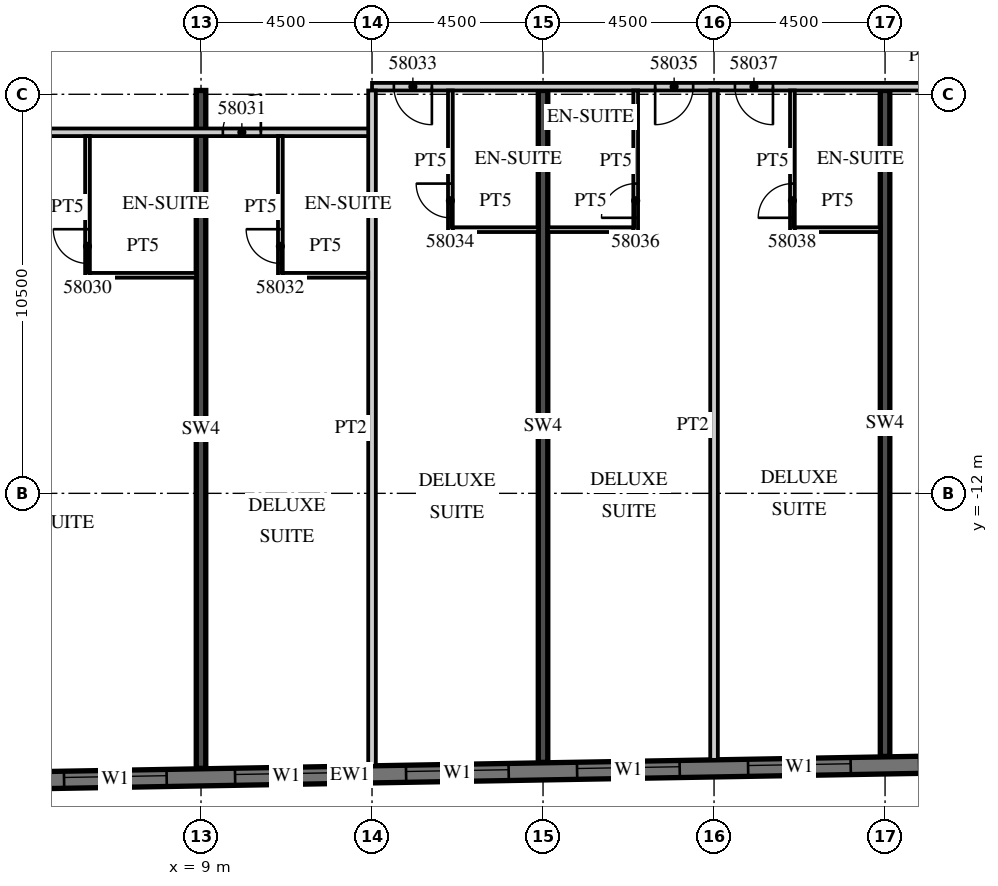
"""IFC4 building model, lengths in metres.
Left out: names, types, materials, properties, quantities, classifications, styles, units other than length and angle.
Written with IfcOpenShell. Run it as: python <this file> out.ifc"""

import sys

from ifc_helpers import new_model, si_unit, direction, frame, frame_2d, origin, place, context, subcontext, project, spatial, rectangle, extrude, element, fill, save


model = new_model("IFC4")
c1 = context("Model", 3, precision=1e-05, world=origin(), true_north=direction((0.0, 1.0)))
c2 = subcontext(c1, "Body", "Model", "MODEL_VIEW")
j1 = project(units=[si_unit("LENGTHUNIT", "METRE"), si_unit("PLANEANGLEUNIT", "RADIAN")], contexts=[c1])
p1 = place(None, origin())
s1 = spatial("IfcSite", under=j1, at=p1, CompositionType="ELEMENT")
p2 = place(p1, origin())
s2 = spatial("IfcBuilding", under=s1, at=p2, CompositionType="ELEMENT")
p3 = place(p2, frame((0.0, 0.0, 237.5)))
s3 = spatial("IfcBuildingStorey", under=s2, at=p3, CompositionType="ELEMENT", Elevation=237.5)
p4 = place(p3, frame((9.0, -19.236, 0.0), z_axis=(0.0, 0.0, 1.0), x_axis=(0.0, 1.0, 0.0)))
e1 = element("IfcWall", 1, at=p4, inside=s3, PredefinedType="SHEAR", context=c2, shape_type="SweptSolid", body=[
    extrude(rectangle(XDim=17.836, YDim=0.25, at=frame_2d((8.918, 0.0))), origin(), (0.0, 0.0, 1.0), 3.3),
])
p5 = place(p3, frame((18.0, -19.079, 0.0), z_axis=(0.0, 0.0, 1.0), x_axis=(0.0, 1.0, 0.0)))
e2 = element("IfcWall", 2, at=p5, inside=s3, PredefinedType="SHEAR", context=c2, shape_type="SweptSolid", body=[
    extrude(rectangle(XDim=17.679, YDim=0.25, at=frame_2d((8.84, 0.0))), origin(), (0.0, 0.0, 1.0), 3.3),
])
p6 = place(p3, frame((27.0, -18.922, 0.0), z_axis=(0.0, 0.0, 1.0), x_axis=(0.0, 1.0, 0.0)))
e3 = element("IfcWall", 3, at=p6, inside=s3, PredefinedType="SHEAR", context=c2, shape_type="SweptSolid", body=[
    extrude(rectangle(XDim=17.522, YDim=0.25, at=frame_2d((8.761, 0.0))), origin(), (0.0, 0.0, 1.0), 3.3),
])
p7 = place(p3, frame((-13.504, -19.866, 0.0), z_axis=(0.0, 0.0, 1.0), x_axis=(0.999847672978, 0.017453676992, 0.0)))
e4 = element("IfcWall", 4, at=p7, inside=s3, PredefinedType="SOLIDWALL", context=c2, shape_type="SweptSolid", body=[
    extrude(rectangle(XDim=52.86, YDim=0.45, at=frame_2d((26.43, 0.0))), origin(), (0.0, 0.0, 1.0), 3.02),
])
p8 = place(p7, frame((0.9, 0.0, 0.45)))
e5 = element("IfcOpeningElement", 5, at=p8, cuts=e4, PredefinedType="OPENING", context=c2, shape_type="SweptSolid", body=[
    extrude(rectangle(XDim=2.7, YDim=2.25, at=frame_2d((1.35, 1.125))), frame((0.0, 0.235, 0.0), z_axis=(0.0, -1.0, 0.0), x_axis=(1.0, 0.0, 0.0)), (0.0, 0.0, 1.0), 0.47),
])
p9 = place(p7, frame((5.401, 0.0, 0.45)))
e6 = element("IfcOpeningElement", 6, at=p9, cuts=e4, PredefinedType="OPENING", context=c2, shape_type="SweptSolid", body=[
    extrude(rectangle(XDim=2.7, YDim=2.25, at=frame_2d((1.35, 1.125))), frame((0.0, 0.235, 0.0), z_axis=(0.0, -1.0, 0.0), x_axis=(1.0, 0.0, 0.0)), (0.0, 0.0, 1.0), 0.47),
])
p10 = place(p7, frame((9.902, 0.0, 0.45)))
e7 = element("IfcOpeningElement", 7, at=p10, cuts=e4, PredefinedType="OPENING", context=c2, shape_type="SweptSolid", body=[
    extrude(rectangle(XDim=2.7, YDim=2.25, at=frame_2d((1.35, 1.125))), frame((0.0, 0.235, 0.0), z_axis=(0.0, -1.0, 0.0), x_axis=(1.0, 0.0, 0.0)), (0.0, 0.0, 1.0), 0.47),
])
p11 = place(p7, frame((14.402, 0.0, 0.45)))
e8 = element("IfcOpeningElement", 8, at=p11, cuts=e4, PredefinedType="OPENING", context=c2, shape_type="SweptSolid", body=[
    extrude(rectangle(XDim=2.7, YDim=2.25, at=frame_2d((1.35, 1.125))), frame((0.0, 0.235, 0.0), z_axis=(0.0, -1.0, 0.0), x_axis=(1.0, 0.0, 0.0)), (0.0, 0.0, 1.0), 0.47),
])
p12 = place(p7, frame((18.903, 0.0, 0.45)))
e9 = element("IfcOpeningElement", 9, at=p12, cuts=e4, PredefinedType="OPENING", context=c2, shape_type="SweptSolid", body=[
    extrude(rectangle(XDim=2.7, YDim=2.25, at=frame_2d((1.35, 1.125))), frame((0.0, 0.235, 0.0), z_axis=(0.0, -1.0, 0.0), x_axis=(1.0, 0.0, 0.0)), (0.0, 0.0, 1.0), 0.47),
])
p13 = place(p7, frame((23.404, 0.0, 0.45)))
e10 = element("IfcOpeningElement", 10, at=p13, cuts=e4, PredefinedType="OPENING", context=c2, shape_type="SweptSolid", body=[
    extrude(rectangle(XDim=2.7, YDim=2.25, at=frame_2d((1.35, 1.125))), frame((0.0, 0.235, 0.0), z_axis=(0.0, -1.0, 0.0), x_axis=(1.0, 0.0, 0.0)), (0.0, 0.0, 1.0), 0.47),
])
p14 = place(p7, frame((27.904, 0.0, 0.45)))
e11 = element("IfcOpeningElement", 11, at=p14, cuts=e4, PredefinedType="OPENING", context=c2, shape_type="SweptSolid", body=[
    extrude(rectangle(XDim=2.7, YDim=2.25, at=frame_2d((1.35, 1.125))), frame((0.0, 0.235, 0.0), z_axis=(0.0, -1.0, 0.0), x_axis=(1.0, 0.0, 0.0)), (0.0, 0.0, 1.0), 0.47),
])
p15 = place(p7, frame((32.405, 0.0, 0.45)))
e12 = element("IfcOpeningElement", 12, at=p15, cuts=e4, PredefinedType="OPENING", context=c2, shape_type="SweptSolid", body=[
    extrude(rectangle(XDim=2.7, YDim=2.25, at=frame_2d((1.35, 1.125))), frame((0.0, 0.235, 0.0), z_axis=(0.0, -1.0, 0.0), x_axis=(1.0, 0.0, 0.0)), (0.0, 0.0, 1.0), 0.47),
])
p16 = place(p7, frame((36.906, 0.0, 0.45)))
e13 = element("IfcOpeningElement", 13, at=p16, cuts=e4, PredefinedType="OPENING", context=c2, shape_type="SweptSolid", body=[
    extrude(rectangle(XDim=2.7, YDim=2.25, at=frame_2d((1.35, 1.125))), frame((0.0, 0.235, 0.0), z_axis=(0.0, -1.0, 0.0), x_axis=(1.0, 0.0, 0.0)), (0.0, 0.0, 1.0), 0.47),
])
p17 = place(p7, frame((41.406, 0.0, 0.45)))
e14 = element("IfcOpeningElement", 14, at=p17, cuts=e4, PredefinedType="OPENING", context=c2, shape_type="SweptSolid", body=[
    extrude(rectangle(XDim=2.7, YDim=2.25, at=frame_2d((1.35, 1.125))), frame((0.0, 0.235, 0.0), z_axis=(0.0, -1.0, 0.0), x_axis=(1.0, 0.0, 0.0)), (0.0, 0.0, 1.0), 0.47),
])
p18 = place(p7, frame((45.907, 0.0, 0.45)))
e15 = element("IfcOpeningElement", 15, at=p18, cuts=e4, PredefinedType="OPENING", context=c2, shape_type="SweptSolid", body=[
    extrude(rectangle(XDim=2.7, YDim=2.25, at=frame_2d((1.35, 1.125))), frame((0.0, 0.235, 0.0), z_axis=(0.0, -1.0, 0.0), x_axis=(1.0, 0.0, 0.0)), (0.0, 0.0, 1.0), 0.47),
])
p19 = place(p3, frame((-13.5, -2.5, 0.0), z_axis=(0.0, 0.0, 1.0), x_axis=(1.0, 0.0, 0.0)))
e16 = element("IfcWall", 16, at=p19, inside=s3, PredefinedType="PARTITIONING", context=c2, shape_type="SweptSolid", body=[
    extrude(rectangle(XDim=27.0, YDim=0.2, at=frame_2d((13.5, 0.0))), origin(), (0.0, 0.0, 1.0), 3.02),
])
p20 = place(p19, frame((0.575, 0.0, 0.0)))
e17 = element("IfcOpeningElement", 17, at=p20, cuts=e16, PredefinedType="OPENING", context=c2, shape_type="SweptSolid", body=[
    extrude(rectangle(XDim=1.0, YDim=2.1, at=frame_2d((0.5, 1.05))), frame((0.0, 0.11, 0.0), z_axis=(0.0, -1.0, 0.0), x_axis=(1.0, 0.0, 0.0)), (0.0, 0.0, 1.0), 0.22),
])
p21 = place(p19, frame((9.863, 0.0, 0.0)))
e18 = element("IfcOpeningElement", 18, at=p21, cuts=e16, PredefinedType="OPENING", context=c2, shape_type="SweptSolid", body=[
    extrude(rectangle(XDim=1.2, YDim=2.1, at=frame_2d((0.6, 1.05))), frame((0.0, 0.11, 0.0), z_axis=(0.0, -1.0, 0.0), x_axis=(1.0, 0.0, 0.0)), (0.0, 0.0, 1.0), 0.22),
])
p22 = place(p19, frame((15.938, 0.0, 0.0)))
e19 = element("IfcOpeningElement", 19, at=p22, cuts=e16, PredefinedType="OPENING", context=c2, shape_type="SweptSolid", body=[
    extrude(rectangle(XDim=1.2, YDim=2.1, at=frame_2d((0.6, 1.05))), frame((0.0, 0.11, 0.0), z_axis=(0.0, -1.0, 0.0), x_axis=(1.0, 0.0, 0.0)), (0.0, 0.0, 1.0), 0.22),
])
p23 = place(p19, frame((23.075, 0.0, 0.0)))
e20 = element("IfcOpeningElement", 20, at=p23, cuts=e16, PredefinedType="OPENING", context=c2, shape_type="SweptSolid", body=[
    extrude(rectangle(XDim=1.0, YDim=2.1, at=frame_2d((0.5, 1.05))), frame((0.0, 0.11, 0.0), z_axis=(0.0, -1.0, 0.0), x_axis=(1.0, 0.0, 0.0)), (0.0, 0.0, 1.0), 0.22),
])
p24 = place(p3, frame((13.5, -1.3, 0.0), z_axis=(0.0, 0.0, 1.0), x_axis=(1.0, 0.0, 0.0)))
e21 = element("IfcWall", 21, at=p24, inside=s3, PredefinedType="PARTITIONING", context=c2, shape_type="SweptSolid", body=[
    extrude(rectangle(XDim=29.091, YDim=0.2, at=frame_2d((14.545, 0.0))), origin(), (0.0, 0.0, 1.0), 3.02),
])
p25 = place(p24, frame((0.575, 0.0, 0.0)))
e22 = element("IfcOpeningElement", 22, at=p25, cuts=e21, PredefinedType="OPENING", context=c2, shape_type="SweptSolid", body=[
    extrude(rectangle(XDim=1.0, YDim=2.1, at=frame_2d((0.5, 1.05))), frame((0.0, 0.11, 0.0), z_axis=(0.0, -1.0, 0.0), x_axis=(1.0, 0.0, 0.0)), (0.0, 0.0, 1.0), 0.22),
])
p26 = place(p24, frame((7.45, 0.0, 0.0)))
e23 = element("IfcOpeningElement", 23, at=p26, cuts=e21, PredefinedType="OPENING", context=c2, shape_type="SweptSolid", body=[
    extrude(rectangle(XDim=1.0, YDim=2.1, at=frame_2d((0.5, 1.05))), frame((0.0, 0.11, 0.0), z_axis=(0.0, -1.0, 0.0), x_axis=(1.0, 0.0, 0.0)), (0.0, 0.0, 1.0), 0.22),
])
p27 = place(p24, frame((9.55, 0.0, 0.0)))
e24 = element("IfcOpeningElement", 24, at=p27, cuts=e21, PredefinedType="OPENING", context=c2, shape_type="SweptSolid", body=[
    extrude(rectangle(XDim=1.0, YDim=2.1, at=frame_2d((0.5, 1.05))), frame((0.0, 0.11, 0.0), z_axis=(0.0, -1.0, 0.0), x_axis=(1.0, 0.0, 0.0)), (0.0, 0.0, 1.0), 0.22),
])
p28 = place(p24, frame((15.938, 0.0, 0.0)))
e25 = element("IfcOpeningElement", 25, at=p28, cuts=e21, PredefinedType="OPENING", context=c2, shape_type="SweptSolid", body=[
    extrude(rectangle(XDim=1.2, YDim=2.1, at=frame_2d((0.6, 1.05))), frame((0.0, 0.11, 0.0), z_axis=(0.0, -1.0, 0.0), x_axis=(1.0, 0.0, 0.0)), (0.0, 0.0, 1.0), 0.22),
])
p29 = place(p24, frame((23.075, 0.0, 0.0)))
e26 = element("IfcOpeningElement", 26, at=p29, cuts=e21, PredefinedType="OPENING", context=c2, shape_type="SweptSolid", body=[
    extrude(rectangle(XDim=1.0, YDim=2.1, at=frame_2d((0.5, 1.05))), frame((0.0, 0.11, 0.0), z_axis=(0.0, -1.0, 0.0), x_axis=(1.0, 0.0, 0.0)), (0.0, 0.0, 1.0), 0.22),
])
p30 = place(p24, frame((27.611, 0.0, 0.0)))
e27 = element("IfcOpeningElement", 27, at=p30, cuts=e21, PredefinedType="OPENING", context=c2, shape_type="SweptSolid", body=[
    extrude(rectangle(XDim=1.0, YDim=2.4, at=frame_2d((0.5, 1.2))), frame((0.0, 0.11, 0.0), z_axis=(0.0, -1.0, 0.0), x_axis=(1.0, 0.0, 0.0)), (0.0, 0.0, 1.0), 0.22),
])
p31 = place(p3, frame((6.013, -6.325, 0.0), z_axis=(0.0, 0.0, 1.0), x_axis=(0.0, 1.0, 0.0)))
e28 = element("IfcWall", 28, at=p31, inside=s3, PredefinedType="PARTITIONING", context=c2, shape_type="SweptSolid", body=[
    extrude(rectangle(XDim=3.725, YDim=0.125, at=frame_2d((1.862, 0.0))), origin(), (0.0, 0.0, 1.0), 3.02),
])
p32 = place(p31, frame((0.375, 0.0, 0.0)))
e29 = element("IfcOpeningElement", 29, at=p32, cuts=e28, PredefinedType="OPENING", context=c2, shape_type="SweptSolid", body=[
    extrude(rectangle(XDim=0.9, YDim=2.1, at=frame_2d((0.45, 1.05))), frame((0.0, 0.073, 0.0), z_axis=(0.0, -1.0, 0.0), x_axis=(1.0, 0.0, 0.0)), (0.0, 0.0, 1.0), 0.145),
])
p33 = place(p3, frame((6.075, -6.263, 0.0), z_axis=(0.0, 0.0, 1.0), x_axis=(1.0, 0.0, 0.0)))
e30 = element("IfcWall", 30, at=p33, inside=s3, PredefinedType="PARTITIONING", context=c2, shape_type="SweptSolid", body=[
    extrude(rectangle(XDim=2.8, YDim=0.125, at=frame_2d((1.4, 0.0))), origin(), (0.0, 0.0, 1.0), 3.02),
])
p34 = place(p3, frame((13.5, -19.17, 0.0), z_axis=(0.0, 0.0, 1.0), x_axis=(0.0, 1.0, 0.0)))
e31 = element("IfcWall", 31, at=p34, inside=s3, PredefinedType="PARTITIONING", context=c2, shape_type="SweptSolid", body=[
    extrude(rectangle(XDim=17.77, YDim=0.2, at=frame_2d((8.885, 0.0))), origin(), (0.0, 0.0, 1.0), 3.02),
])
p35 = place(p3, frame((11.088, -6.325, 0.0), z_axis=(0.0, 0.0, 1.0), x_axis=(0.0, 1.0, 0.0)))
e32 = element("IfcWall", 32, at=p35, inside=s3, PredefinedType="PARTITIONING", context=c2, shape_type="SweptSolid", body=[
    extrude(rectangle(XDim=3.725, YDim=0.125, at=frame_2d((1.862, 0.0))), origin(), (0.0, 0.0, 1.0), 3.02),
])
p36 = place(p35, frame((0.375, 0.0, 0.0)))
e33 = element("IfcOpeningElement", 33, at=p36, cuts=e32, PredefinedType="OPENING", context=c2, shape_type="SweptSolid", body=[
    extrude(rectangle(XDim=0.9, YDim=2.1, at=frame_2d((0.45, 1.05))), frame((0.0, 0.073, 0.0), z_axis=(0.0, -1.0, 0.0), x_axis=(1.0, 0.0, 0.0)), (0.0, 0.0, 1.0), 0.145),
])
p37 = place(p3, frame((11.15, -6.263, 0.0), z_axis=(0.0, 0.0, 1.0), x_axis=(1.0, 0.0, 0.0)))
e34 = element("IfcWall", 34, at=p37, inside=s3, PredefinedType="PARTITIONING", context=c2, shape_type="SweptSolid", body=[
    extrude(rectangle(XDim=2.25, YDim=0.125, at=frame_2d((1.125, 0.0))), origin(), (0.0, 0.0, 1.0), 3.02),
])
p38 = place(p3, frame((15.562, -5.125, 0.0), z_axis=(0.0, 0.0, 1.0), x_axis=(0.0, 1.0, 0.0)))
e35 = element("IfcWall", 35, at=p38, inside=s3, PredefinedType="PARTITIONING", context=c2, shape_type="SweptSolid", body=[
    extrude(rectangle(XDim=3.725, YDim=0.125, at=frame_2d((1.863, 0.0))), origin(), (0.0, 0.0, 1.0), 3.02),
])
p39 = place(p38, frame((0.375, 0.0, 0.0)))
e36 = element("IfcOpeningElement", 36, at=p39, cuts=e35, PredefinedType="OPENING", context=c2, shape_type="SweptSolid", body=[
    extrude(rectangle(XDim=0.9, YDim=2.1, at=frame_2d((0.45, 1.05))), frame((0.0, 0.073, 0.0), z_axis=(0.0, -1.0, 0.0), x_axis=(1.0, 0.0, 0.0)), (0.0, 0.0, 1.0), 0.145),
])
p40 = place(p3, frame((15.625, -5.062, 0.0), z_axis=(0.0, 0.0, 1.0), x_axis=(1.0, 0.0, 0.0)))
e37 = element("IfcWall", 37, at=p40, inside=s3, PredefinedType="PARTITIONING", context=c2, shape_type="SweptSolid", body=[
    extrude(rectangle(XDim=2.25, YDim=0.125, at=frame_2d((1.125, 0.0))), origin(), (0.0, 0.0, 1.0), 3.02),
])
p41 = place(p3, frame((22.5, -19.013, 0.0), z_axis=(0.0, 0.0, 1.0), x_axis=(0.0, 1.0, 0.0)))
e38 = element("IfcWall", 38, at=p41, inside=s3, PredefinedType="PARTITIONING", context=c2, shape_type="SweptSolid", body=[
    extrude(rectangle(XDim=17.613, YDim=0.2, at=frame_2d((8.807, 0.0))), origin(), (0.0, 0.0, 1.0), 3.02),
])
p42 = place(p3, frame((20.438, -5.125, 0.0), z_axis=(0.0, 0.0, 1.0), x_axis=(0.0, 1.0, 0.0)))
e39 = element("IfcWall", 39, at=p42, inside=s3, PredefinedType="PARTITIONING", context=c2, shape_type="SweptSolid", body=[
    extrude(rectangle(XDim=3.725, YDim=0.125, at=frame_2d((1.863, 0.0))), origin(), (0.0, 0.0, 1.0), 3.02),
])
p43 = place(p42, frame((0.375, 0.0, 0.0)))
e40 = element("IfcOpeningElement", 40, at=p43, cuts=e39, PredefinedType="OPENING", context=c2, shape_type="SweptSolid", body=[
    extrude(rectangle(XDim=0.9, YDim=2.1, at=frame_2d((0.45, 1.05))), frame((0.0, 0.073, 0.0), z_axis=(0.0, -1.0, 0.0), x_axis=(1.0, 0.0, 0.0)), (0.0, 0.0, 1.0), 0.145),
])
p44 = place(p3, frame((18.125, -5.062, 0.0), z_axis=(0.0, 0.0, 1.0), x_axis=(1.0, 0.0, 0.0)))
e41 = element("IfcWall", 41, at=p44, inside=s3, PredefinedType="PARTITIONING", context=c2, shape_type="SweptSolid", body=[
    extrude(rectangle(XDim=2.25, YDim=0.125, at=frame_2d((1.125, 0.0))), origin(), (0.0, 0.0, 1.0), 3.02),
])
p45 = place(p3, frame((24.562, -5.125, 0.0), z_axis=(0.0, 0.0, 1.0), x_axis=(0.0, 1.0, 0.0)))
e42 = element("IfcWall", 42, at=p45, inside=s3, PredefinedType="PARTITIONING", context=c2, shape_type="SweptSolid", body=[
    extrude(rectangle(XDim=3.725, YDim=0.125, at=frame_2d((1.863, 0.0))), origin(), (0.0, 0.0, 1.0), 3.02),
])
p46 = place(p45, frame((0.375, 0.0, 0.0)))
e43 = element("IfcOpeningElement", 43, at=p46, cuts=e42, PredefinedType="OPENING", context=c2, shape_type="SweptSolid", body=[
    extrude(rectangle(XDim=0.9, YDim=2.1, at=frame_2d((0.45, 1.05))), frame((0.0, 0.073, 0.0), z_axis=(0.0, -1.0, 0.0), x_axis=(1.0, 0.0, 0.0)), (0.0, 0.0, 1.0), 0.145),
])
p47 = place(p3, frame((24.625, -5.062, 0.0), z_axis=(0.0, 0.0, 1.0), x_axis=(1.0, 0.0, 0.0)))
e44 = element("IfcWall", 44, at=p47, inside=s3, PredefinedType="PARTITIONING", context=c2, shape_type="SweptSolid", body=[
    extrude(rectangle(XDim=2.25, YDim=0.125, at=frame_2d((1.125, 0.0))), origin(), (0.0, 0.0, 1.0), 3.02),
])
p48 = place(p12, origin())
e45 = element("IfcWindow", 45, at=p48, inside=s3, PartitioningType="SINGLE_PANEL", PredefinedType="WINDOW", context=c2, shape_type="SweptSolid", body=[
    extrude(rectangle(XDim=2.7, YDim=2.25, at=frame_2d((1.35, 1.125))), frame((0.0, 0.09, 0.0), z_axis=(0.0, -1.0, 0.0), x_axis=(1.0, 0.0, 0.0)), (0.0, 0.0, 1.0), 0.06),
])
fill(e9, e45)
p49 = place(p13, origin())
e46 = element("IfcWindow", 46, at=p49, inside=s3, PartitioningType="SINGLE_PANEL", PredefinedType="WINDOW", context=c2, shape_type="SweptSolid", body=[
    extrude(rectangle(XDim=2.7, YDim=2.25, at=frame_2d((1.35, 1.125))), frame((0.0, 0.09, 0.0), z_axis=(0.0, -1.0, 0.0), x_axis=(1.0, 0.0, 0.0)), (0.0, 0.0, 1.0), 0.06),
])
fill(e10, e46)
p50 = place(p14, origin())
e47 = element("IfcWindow", 47, at=p50, inside=s3, PartitioningType="SINGLE_PANEL", PredefinedType="WINDOW", context=c2, shape_type="SweptSolid", body=[
    extrude(rectangle(XDim=2.7, YDim=2.25, at=frame_2d((1.35, 1.125))), frame((0.0, 0.09, 0.0), z_axis=(0.0, -1.0, 0.0), x_axis=(1.0, 0.0, 0.0)), (0.0, 0.0, 1.0), 0.06),
])
fill(e11, e47)
p51 = place(p15, origin())
e48 = element("IfcWindow", 48, at=p51, inside=s3, PartitioningType="SINGLE_PANEL", PredefinedType="WINDOW", context=c2, shape_type="SweptSolid", body=[
    extrude(rectangle(XDim=2.7, YDim=2.25, at=frame_2d((1.35, 1.125))), frame((0.0, 0.09, 0.0), z_axis=(0.0, -1.0, 0.0), x_axis=(1.0, 0.0, 0.0)), (0.0, 0.0, 1.0), 0.06),
])
fill(e12, e48)
p52 = place(p16, origin())
e49 = element("IfcWindow", 49, at=p52, inside=s3, PartitioningType="SINGLE_PANEL", PredefinedType="WINDOW", context=c2, shape_type="SweptSolid", body=[
    extrude(rectangle(XDim=2.7, YDim=2.25, at=frame_2d((1.35, 1.125))), frame((0.0, 0.09, 0.0), z_axis=(0.0, -1.0, 0.0), x_axis=(1.0, 0.0, 0.0)), (0.0, 0.0, 1.0), 0.06),
])
fill(e13, e49)
p53 = place(p32, origin())
e50 = element("IfcDoor", 50, at=p53, inside=s3, OperationType="SINGLE_SWING_RIGHT", PredefinedType="DOOR", context=c2, shape_type="SweptSolid", body=[
    extrude(rectangle(XDim=0.9, YDim=2.1, at=frame_2d((0.45, 1.05))), frame((0.0, 0.025, 0.0), z_axis=(0.0, -1.0, 0.0), x_axis=(1.0, 0.0, 0.0)), (0.0, 0.0, 1.0), 0.05),
])
fill(e29, e50)
p54 = place(p23, origin())
e51 = element("IfcDoor", 51, at=p54, inside=s3, OperationType="SINGLE_SWING_RIGHT", PredefinedType="DOOR", context=c2, shape_type="SweptSolid", body=[
    extrude(rectangle(XDim=1.0, YDim=2.1, at=frame_2d((0.5, 1.05))), frame((0.0, 0.025, 0.0), z_axis=(0.0, -1.0, 0.0), x_axis=(1.0, 0.0, 0.0)), (0.0, 0.0, 1.0), 0.05),
])
fill(e20, e51)
p55 = place(p36, origin())
e52 = element("IfcDoor", 52, at=p55, inside=s3, OperationType="SINGLE_SWING_RIGHT", PredefinedType="DOOR", context=c2, shape_type="SweptSolid", body=[
    extrude(rectangle(XDim=0.9, YDim=2.1, at=frame_2d((0.45, 1.05))), frame((0.0, 0.025, 0.0), z_axis=(0.0, -1.0, 0.0), x_axis=(1.0, 0.0, 0.0)), (0.0, 0.0, 1.0), 0.05),
])
fill(e33, e52)
p56 = place(p25, origin())
e53 = element("IfcDoor", 53, at=p56, inside=s3, OperationType="SINGLE_SWING_RIGHT", PredefinedType="DOOR", context=c2, shape_type="SweptSolid", body=[
    extrude(rectangle(XDim=1.0, YDim=2.1, at=frame_2d((0.5, 1.05))), frame((0.0, 0.025, 0.0), z_axis=(0.0, -1.0, 0.0), x_axis=(1.0, 0.0, 0.0)), (0.0, 0.0, 1.0), 0.05),
])
fill(e22, e53)
p57 = place(p39, origin())
e54 = element("IfcDoor", 54, at=p57, inside=s3, OperationType="SINGLE_SWING_RIGHT", PredefinedType="DOOR", context=c2, shape_type="SweptSolid", body=[
    extrude(rectangle(XDim=0.9, YDim=2.1, at=frame_2d((0.45, 1.05))), frame((0.0, 0.025, 0.0), z_axis=(0.0, -1.0, 0.0), x_axis=(1.0, 0.0, 0.0)), (0.0, 0.0, 1.0), 0.05),
])
fill(e36, e54)
p58 = place(p26, origin())
e55 = element("IfcDoor", 55, at=p58, inside=s3, OperationType="SINGLE_SWING_LEFT", PredefinedType="DOOR", context=c2, shape_type="SweptSolid", body=[
    extrude(rectangle(XDim=1.0, YDim=2.1, at=frame_2d((0.5, 1.05))), frame((0.0, 0.025, 0.0), z_axis=(0.0, -1.0, 0.0), x_axis=(1.0, 0.0, 0.0)), (0.0, 0.0, 1.0), 0.05),
])
fill(e23, e55)
p59 = place(p43, origin())
e56 = element("IfcDoor", 56, at=p59, inside=s3, OperationType="SINGLE_SWING_LEFT", PredefinedType="DOOR", context=c2, shape_type="SweptSolid", body=[
    extrude(rectangle(XDim=0.9, YDim=2.1, at=frame_2d((0.45, 1.05))), frame((0.0, 0.025, 0.0), z_axis=(0.0, -1.0, 0.0), x_axis=(1.0, 0.0, 0.0)), (0.0, 0.0, 1.0), 0.05),
])
fill(e40, e56)
p60 = place(p27, origin())
e57 = element("IfcDoor", 57, at=p60, inside=s3, OperationType="SINGLE_SWING_RIGHT", PredefinedType="DOOR", context=c2, shape_type="SweptSolid", body=[
    extrude(rectangle(XDim=1.0, YDim=2.1, at=frame_2d((0.5, 1.05))), frame((0.0, 0.025, 0.0), z_axis=(0.0, -1.0, 0.0), x_axis=(1.0, 0.0, 0.0)), (0.0, 0.0, 1.0), 0.05),
])
fill(e24, e57)
p61 = place(p46, origin())
e58 = element("IfcDoor", 58, at=p61, inside=s3, OperationType="SINGLE_SWING_LEFT", PredefinedType="DOOR", context=c2, shape_type="SweptSolid", body=[
    extrude(rectangle(XDim=0.9, YDim=2.1, at=frame_2d((0.45, 1.05))), frame((0.0, 0.025, 0.0), z_axis=(0.0, -1.0, 0.0), x_axis=(1.0, 0.0, 0.0)), (0.0, 0.0, 1.0), 0.05),
])
fill(e43, e58)
save(model, sys.argv[1])
